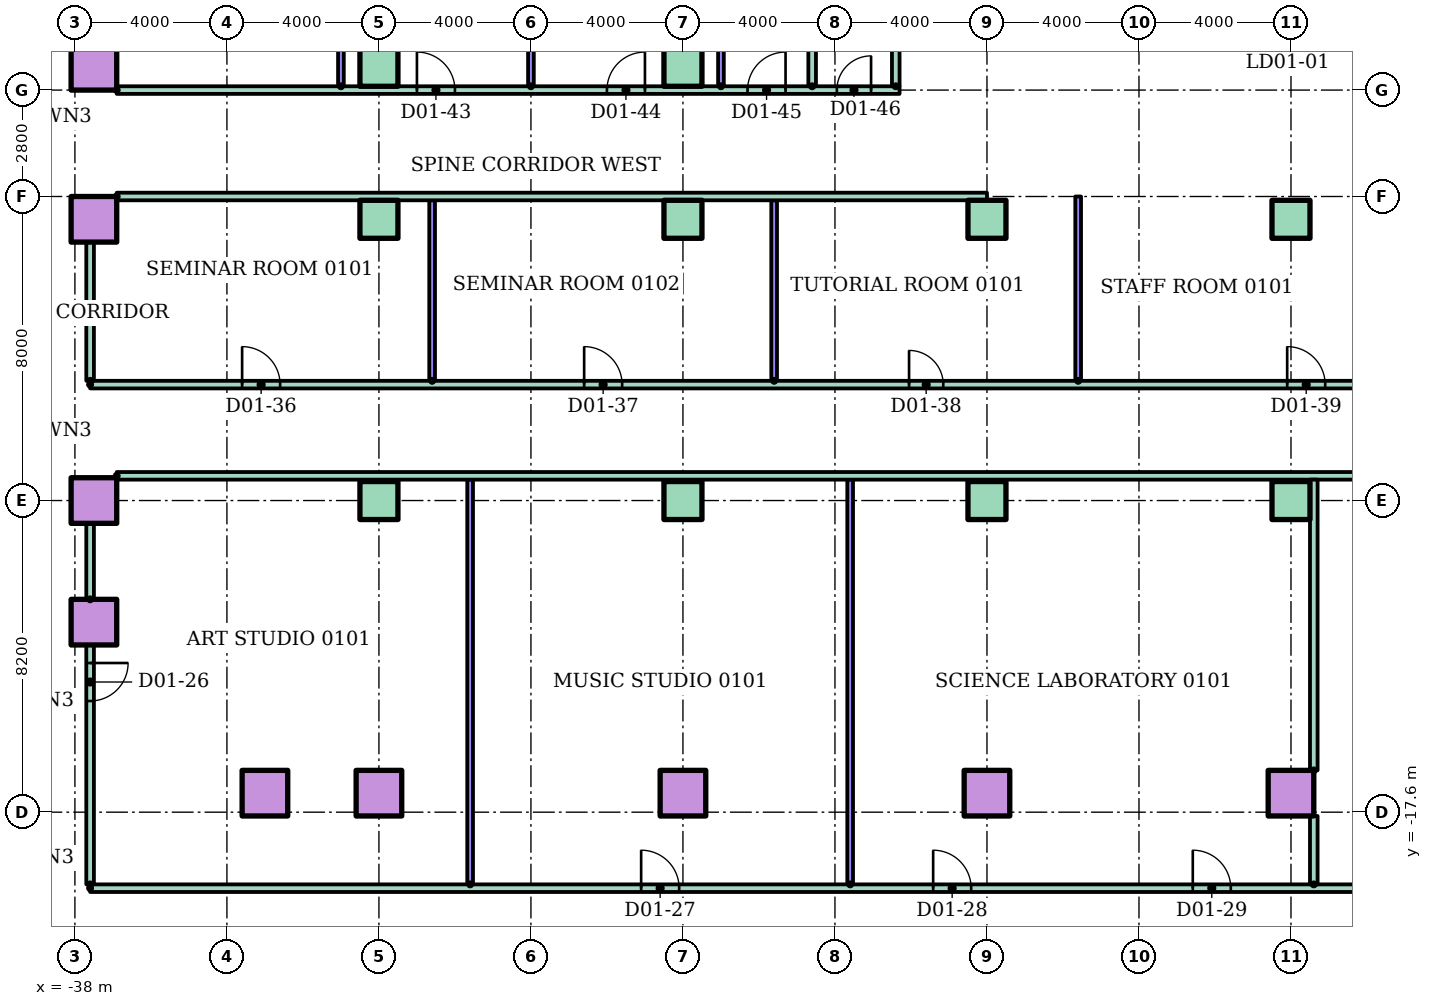
"""IFC4 building model, lengths in metres.
Left out: names, types, materials, properties, quantities, classifications, styles, units other than length and angle.
Written with IfcOpenShell. Run it as: python <this file> out.ifc"""

import sys

from ifc_helpers import new_model, si_unit, direction, frame, frame_2d, origin, origin_2d, place, context, subcontext, project, spatial, rectangle, hollow_rectangle, extrude, element, fill, save


model = new_model("IFC4")
c1 = context("Model", 3, precision=1e-05, world=origin(), true_north=direction((0.0, 1.0)))
c2 = subcontext(c1, "Body", "Model", "MODEL_VIEW")
j1 = project(units=[si_unit("LENGTHUNIT", "METRE"), si_unit("PLANEANGLEUNIT", "RADIAN")], contexts=[c1])
p1 = place(None, origin())
s1 = spatial("IfcSite", under=j1, at=p1, CompositionType="ELEMENT")
p2 = place(p1, origin())
s2 = spatial("IfcBuilding", under=s1, at=p2, CompositionType="ELEMENT")
p3 = place(p2, frame((0.0, 0.0, 6.0)))
s3 = spatial("IfcBuildingStorey", under=s2, at=p3, CompositionType="ELEMENT", Elevation=6.0)
for number, where in (
    (1, (-33.0, -17.1, 0.0)),
    (2, (-30.0, -17.1, 0.0)),
    (3, (-22.0, -17.1, 0.0)),
    (4, (-14.0, -17.1, 0.0)),
    (5, (-6.0, -17.1, 0.0)),
    (6, (-37.5, -12.6, 0.0)),
    (7, (-37.5, -9.4, 0.0)),
):
    element("IfcColumn", number, at=place(p3, frame(where)), inside=s3, PredefinedType="COLUMN", context=c2, shape_type="SweptSolid", body=[
        extrude(hollow_rectangle(XDim=1.2, YDim=1.2, WallThickness=0.06, at=origin_2d()), origin(), (0.0, 0.0, 1.0), 4.0),
    ])
for number, where in (
    (8, (-30.0, -9.4, 0.0)),
    (9, (-22.0, -9.4, 0.0)),
    (10, (-14.0, -9.4, 0.0)),
    (11, (-6.0, -9.4, 0.0)),
):
    element("IfcColumn", number, at=place(p3, frame(where)), inside=s3, PredefinedType="COLUMN", context=c2, shape_type="SweptSolid", body=[
        extrude(rectangle(XDim=1.0, YDim=1.0, at=origin_2d()), origin(), (0.0, 0.0, 1.0), 4.0),
    ])
p4 = place(p3, frame((-37.5, -2.0, 0.0)))
e12 = element("IfcColumn", 12, at=p4, inside=s3, PredefinedType="COLUMN", context=c2, shape_type="SweptSolid", body=[
    extrude(hollow_rectangle(XDim=1.2, YDim=1.2, WallThickness=0.06, at=origin_2d()), origin(), (0.0, 0.0, 1.0), 4.0),
])
for number, where in (
    (13, (-30.0, -2.0, 0.0)),
    (14, (-22.0, -2.0, 0.0)),
    (15, (-14.0, -2.0, 0.0)),
    (16, (-6.0, -2.0, 0.0)),
):
    element("IfcColumn", number, at=place(p3, frame(where)), inside=s3, PredefinedType="COLUMN", context=c2, shape_type="SweptSolid", body=[
        extrude(rectangle(XDim=1.0, YDim=1.0, at=origin_2d()), origin(), (0.0, 0.0, 1.0), 4.0),
    ])
p5 = place(p3, frame((-37.5, 2.0, 0.0)))
e17 = element("IfcColumn", 17, at=p5, inside=s3, PredefinedType="COLUMN", context=c2, shape_type="SweptSolid", body=[
    extrude(hollow_rectangle(XDim=1.2, YDim=1.2, WallThickness=0.06, at=origin_2d()), origin(), (0.0, 0.0, 1.0), 4.0),
])
for number, where in (
    (18, (-30.0, 2.0, 0.0)),
    (19, (-22.0, 2.0, 0.0)),
):
    element("IfcColumn", number, at=place(p3, frame(where)), inside=s3, PredefinedType="COLUMN", context=c2, shape_type="SweptSolid", body=[
        extrude(rectangle(XDim=1.0, YDim=1.0, at=origin_2d()), origin(), (0.0, 0.0, 1.0), 4.0),
    ])
p6 = place(p3, frame((-37.6, -19.6, 0.0)))
e20 = element("IfcWall", 20, at=p6, inside=s3, PredefinedType="PARTITIONING", context=c2, shape_type="SweptSolid", body=[
    extrude(rectangle(XDim=75.2, YDim=0.2, at=frame_2d((37.6, 0.0))), origin(), (0.0, 0.0, 1.0), 3.7),
])
p7 = place(p6, frame((14.5, 0.0, 0.0)))
e21 = element("IfcOpeningElement", 21, at=p7, cuts=e20, PredefinedType="OPENING", context=c2, shape_type="SweptSolid", body=[
    extrude(rectangle(XDim=1.0, YDim=2.1, at=frame_2d((0.5, 1.05))), frame((0.0, 0.11, 0.0), z_axis=(0.0, -1.0, 0.0), x_axis=(1.0, 0.0, 0.0)), (0.0, 0.0, 1.0), 0.22),
])
p8 = place(p6, frame((22.184, 0.0, 0.0)))
e22 = element("IfcOpeningElement", 22, at=p8, cuts=e20, PredefinedType="OPENING", context=c2, shape_type="SweptSolid", body=[
    extrude(rectangle(XDim=1.0, YDim=2.1, at=frame_2d((0.5, 1.05))), frame((0.0, 0.11, 0.0), z_axis=(0.0, -1.0, 0.0), x_axis=(1.0, 0.0, 0.0)), (0.0, 0.0, 1.0), 0.22),
])
p9 = place(p6, frame((29.016, 0.0, 0.0)))
e23 = element("IfcOpeningElement", 23, at=p9, cuts=e20, PredefinedType="OPENING", context=c2, shape_type="SweptSolid", body=[
    extrude(rectangle(XDim=1.0, YDim=2.1, at=frame_2d((0.5, 1.05))), frame((0.0, 0.11, 0.0), z_axis=(0.0, -1.0, 0.0), x_axis=(1.0, 0.0, 0.0)), (0.0, 0.0, 1.0), 0.22),
])
p10 = place(p6, frame((34.34, 0.0, 0.0)))
e24 = element("IfcOpeningElement", 24, at=p10, cuts=e20, PredefinedType="OPENING", context=c2, shape_type="SweptSolid", body=[
    extrude(rectangle(XDim=1.0, YDim=2.1, at=frame_2d((0.5, 1.05))), frame((0.0, 0.11, 0.0), z_axis=(0.0, -1.0, 0.0), x_axis=(1.0, 0.0, 0.0)), (0.0, 0.0, 1.0), 0.22),
])
p11 = place(p6, frame((41.06, 0.0, 0.0)))
e25 = element("IfcOpeningElement", 25, at=p11, cuts=e20, PredefinedType="OPENING", context=c2, shape_type="SweptSolid", body=[
    extrude(rectangle(XDim=1.0, YDim=2.1, at=frame_2d((0.5, 1.05))), frame((0.0, 0.11, 0.0), z_axis=(0.0, -1.0, 0.0), x_axis=(1.0, 0.0, 0.0)), (0.0, 0.0, 1.0), 0.22),
])
p12 = place(p6, frame((46.95, 0.0, 0.0)))
e26 = element("IfcOpeningElement", 26, at=p12, cuts=e20, PredefinedType="OPENING", context=c2, shape_type="SweptSolid", body=[
    extrude(rectangle(XDim=1.1, YDim=2.1, at=frame_2d((0.55, 1.05))), frame((0.0, 0.11, 0.0), z_axis=(0.0, -1.0, 0.0), x_axis=(1.0, 0.0, 0.0)), (0.0, 0.0, 1.0), 0.22),
])
p13 = place(p6, frame((55.35, 0.0, 0.0)))
e27 = element("IfcOpeningElement", 27, at=p13, cuts=e20, PredefinedType="OPENING", context=c2, shape_type="SweptSolid", body=[
    extrude(rectangle(XDim=1.1, YDim=2.1, at=frame_2d((0.55, 1.05))), frame((0.0, 0.11, 0.0), z_axis=(0.0, -1.0, 0.0), x_axis=(1.0, 0.0, 0.0)), (0.0, 0.0, 1.0), 0.22),
])
p14 = place(p6, frame((62.7, 0.0, 0.0)))
e28 = element("IfcOpeningElement", 28, at=p14, cuts=e20, PredefinedType="OPENING", context=c2, shape_type="SweptSolid", body=[
    extrude(rectangle(XDim=1.0, YDim=2.1, at=frame_2d((0.5, 1.05))), frame((0.0, 0.11, 0.0), z_axis=(0.0, -1.0, 0.0), x_axis=(1.0, 0.0, 0.0)), (0.0, 0.0, 1.0), 0.22),
])
p15 = place(p3, frame((-36.9, -8.75, 0.0)))
e29 = element("IfcWall", 29, at=p15, inside=s3, PredefinedType="PARTITIONING", context=c2, shape_type="SweptSolid", body=[
    extrude(rectangle(XDim=73.8, YDim=0.2, at=frame_2d((36.9, 0.0))), origin(), (0.0, 0.0, 1.0), 3.7),
])
p16 = place(p3, frame((-37.6, -6.35, 0.0)))
e30 = element("IfcWall", 30, at=p16, inside=s3, PredefinedType="PARTITIONING", context=c2, shape_type="SweptSolid", body=[
    extrude(rectangle(XDim=75.2, YDim=0.2, at=frame_2d((37.6, 0.0))), origin(), (0.0, 0.0, 1.0), 3.7),
])
p17 = place(p16, frame((4.0, 0.0, 0.0)))
e31 = element("IfcOpeningElement", 31, at=p17, cuts=e30, PredefinedType="OPENING", context=c2, shape_type="SweptSolid", body=[
    extrude(rectangle(XDim=1.0, YDim=2.1, at=frame_2d((0.5, 1.05))), frame((0.0, 0.11, 0.0), z_axis=(0.0, -1.0, 0.0), x_axis=(1.0, 0.0, 0.0)), (0.0, 0.0, 1.0), 0.22),
])
p18 = place(p16, frame((13.0, 0.0, 0.0)))
e32 = element("IfcOpeningElement", 32, at=p18, cuts=e30, PredefinedType="OPENING", context=c2, shape_type="SweptSolid", body=[
    extrude(rectangle(XDim=1.0, YDim=2.1, at=frame_2d((0.5, 1.05))), frame((0.0, 0.11, 0.0), z_axis=(0.0, -1.0, 0.0), x_axis=(1.0, 0.0, 0.0)), (0.0, 0.0, 1.0), 0.22),
])
p19 = place(p16, frame((21.55, 0.0, 0.0)))
e33 = element("IfcOpeningElement", 33, at=p19, cuts=e30, PredefinedType="OPENING", context=c2, shape_type="SweptSolid", body=[
    extrude(rectangle(XDim=0.9, YDim=2.1, at=frame_2d((0.45, 1.05))), frame((0.0, 0.11, 0.0), z_axis=(0.0, -1.0, 0.0), x_axis=(1.0, 0.0, 0.0)), (0.0, 0.0, 1.0), 0.22),
])
p20 = place(p16, frame((31.5, 0.0, 0.0)))
e34 = element("IfcOpeningElement", 34, at=p20, cuts=e30, PredefinedType="OPENING", context=c2, shape_type="SweptSolid", body=[
    extrude(rectangle(XDim=1.0, YDim=2.1, at=frame_2d((0.5, 1.05))), frame((0.0, 0.11, 0.0), z_axis=(0.0, -1.0, 0.0), x_axis=(1.0, 0.0, 0.0)), (0.0, 0.0, 1.0), 0.22),
])
p21 = place(p16, frame((43.5, 0.0, 0.0)))
e35 = element("IfcOpeningElement", 35, at=p21, cuts=e30, PredefinedType="OPENING", context=c2, shape_type="SweptSolid", body=[
    extrude(rectangle(XDim=1.0, YDim=2.1, at=frame_2d((0.5, 1.05))), frame((0.0, 0.11, 0.0), z_axis=(0.0, -1.0, 0.0), x_axis=(1.0, 0.0, 0.0)), (0.0, 0.0, 1.0), 0.22),
])
p22 = place(p16, frame((62.1, 0.0, 0.0)))
e36 = element("IfcOpeningElement", 36, at=p22, cuts=e30, PredefinedType="OPENING", context=c2, shape_type="SweptSolid", body=[
    extrude(rectangle(XDim=1.0, YDim=2.1, at=frame_2d((0.5, 1.05))), frame((0.0, 0.11, 0.0), z_axis=(0.0, -1.0, 0.0), x_axis=(1.0, 0.0, 0.0)), (0.0, 0.0, 1.0), 0.22),
])
p23 = place(p3, frame((-36.9, -1.4, 0.0)))
e37 = element("IfcWall", 37, at=p23, inside=s3, PredefinedType="PARTITIONING", context=c2, shape_type="SweptSolid", body=[
    extrude(rectangle(XDim=22.9, YDim=0.2, at=frame_2d((11.45, 0.0))), origin(), (0.0, 0.0, 1.0), 3.7),
])
p24 = place(p3, frame((-36.9, 1.4, 0.0)))
e38 = element("IfcWall", 38, at=p24, inside=s3, PredefinedType="PARTITIONING", context=c2, shape_type="SweptSolid", body=[
    extrude(rectangle(XDim=20.6, YDim=0.2, at=frame_2d((10.3, 0.0))), origin(), (0.0, 0.0, 1.0), 3.7),
])
p25 = place(p24, frame((7.9, 0.0, 0.0)))
e39 = element("IfcOpeningElement", 39, at=p25, cuts=e38, PredefinedType="OPENING", context=c2, shape_type="SweptSolid", body=[
    extrude(rectangle(XDim=1.0, YDim=2.1, at=frame_2d((0.5, 1.05))), frame((0.0, 0.11, 0.0), z_axis=(0.0, -1.0, 0.0), x_axis=(1.0, 0.0, 0.0)), (0.0, 0.0, 1.0), 0.22),
])
p26 = place(p24, frame((12.9, 0.0, 0.0)))
e40 = element("IfcOpeningElement", 40, at=p26, cuts=e38, PredefinedType="OPENING", context=c2, shape_type="SweptSolid", body=[
    extrude(rectangle(XDim=1.0, YDim=2.1, at=frame_2d((0.5, 1.05))), frame((0.0, 0.11, 0.0), z_axis=(0.0, -1.0, 0.0), x_axis=(1.0, 0.0, 0.0)), (0.0, 0.0, 1.0), 0.22),
])
p27 = place(p24, frame((16.6, 0.0, 0.0)))
e41 = element("IfcOpeningElement", 41, at=p27, cuts=e38, PredefinedType="OPENING", context=c2, shape_type="SweptSolid", body=[
    extrude(rectangle(XDim=1.0, YDim=2.1, at=frame_2d((0.5, 1.05))), frame((0.0, 0.11, 0.0), z_axis=(0.0, -1.0, 0.0), x_axis=(1.0, 0.0, 0.0)), (0.0, 0.0, 1.0), 0.22),
])
p28 = place(p24, frame((18.95, 0.0, 0.0)))
e42 = element("IfcOpeningElement", 42, at=p28, cuts=e38, PredefinedType="OPENING", context=c2, shape_type="SweptSolid", body=[
    extrude(rectangle(XDim=0.9, YDim=2.1, at=frame_2d((0.45, 1.05))), frame((0.0, 0.11, 0.0), z_axis=(0.0, -1.0, 0.0), x_axis=(1.0, 0.0, 0.0)), (0.0, 0.0, 1.0), 0.22),
])
p29 = place(p3, frame((-37.6, -19.5, 0.0), z_axis=(0.0, 0.0, 1.0), x_axis=(0.0, 1.0, 0.0)))
e43 = element("IfcWall", 43, at=p29, inside=s3, PredefinedType="PARTITIONING", context=c2, shape_type="SweptSolid", body=[
    extrude(rectangle(XDim=6.3, YDim=0.2, at=frame_2d((3.15, 0.0))), origin(), (0.0, 0.0, 1.0), 3.7),
])
p30 = place(p29, frame((4.825, 0.0, 0.0)))
e44 = element("IfcOpeningElement", 44, at=p30, cuts=e43, PredefinedType="OPENING", context=c2, shape_type="SweptSolid", body=[
    extrude(rectangle(XDim=1.0, YDim=2.1, at=frame_2d((0.5, 1.05))), frame((0.0, 0.11, 0.0), z_axis=(0.0, -1.0, 0.0), x_axis=(1.0, 0.0, 0.0)), (0.0, 0.0, 1.0), 0.22),
])
p31 = place(p3, frame((-37.6, -12.0, 0.0), z_axis=(0.0, 0.0, 1.0), x_axis=(0.0, 1.0, 0.0)))
e45 = element("IfcWall", 45, at=p31, inside=s3, PredefinedType="PARTITIONING", context=c2, shape_type="SweptSolid", body=[
    extrude(rectangle(XDim=2.0, YDim=0.2, at=frame_2d((1.0, 0.0))), origin(), (0.0, 0.0, 1.0), 3.7),
])
p32 = place(p3, frame((-37.6, -6.25, 0.0), z_axis=(0.0, 0.0, 1.0), x_axis=(0.0, 1.0, 0.0)))
e46 = element("IfcWall", 46, at=p32, inside=s3, PredefinedType="PARTITIONING", context=c2, shape_type="SweptSolid", body=[
    extrude(rectangle(XDim=3.65, YDim=0.2, at=frame_2d((1.825, 0.0))), origin(), (0.0, 0.0, 1.0), 3.7),
])
p33 = place(p3, frame((-31.0, 1.5, 0.0), z_axis=(0.0, 0.0, 1.0), x_axis=(0.0, 1.0, 0.0)))
e47 = element("IfcWall", 47, at=p33, inside=s3, PredefinedType="PARTITIONING", context=c2, shape_type="SweptSolid", body=[
    extrude(rectangle(XDim=7.0, YDim=0.15, at=frame_2d((3.5, 0.0))), origin(), (0.0, 0.0, 1.0), 3.7),
])
p34 = place(p3, frame((-28.6, -6.25, 0.0), z_axis=(0.0, 0.0, 1.0), x_axis=(0.0, 1.0, 0.0)))
e48 = element("IfcWall", 48, at=p34, inside=s3, PredefinedType="PARTITIONING", context=c2, shape_type="SweptSolid", body=[
    extrude(rectangle(XDim=4.75, YDim=0.15, at=frame_2d((2.375, 0.0))), origin(), (0.0, 0.0, 1.0), 3.7),
])
p35 = place(p3, frame((-27.6, -19.5, 0.0), z_axis=(0.0, 0.0, 1.0), x_axis=(0.0, 1.0, 0.0)))
e49 = element("IfcWall", 49, at=p35, inside=s3, PredefinedType="PARTITIONING", context=c2, shape_type="SweptSolid", body=[
    extrude(rectangle(XDim=10.65, YDim=0.15, at=frame_2d((5.325, 0.0))), origin(), (0.0, 0.0, 1.0), 3.7),
])
for number, where, z_axis, x_axis in (
    (50, (-26.0, 1.5, 0.0), (0.0, 0.0, 1.0), (0.0, 1.0, 0.0)),
    (51, (-21.0, 1.5, 0.0), (0.0, 0.0, 1.0), (0.0, 1.0, 0.0)),
):
    element("IfcWall", number, at=place(p3, frame(where, z_axis=z_axis, x_axis=x_axis)), inside=s3, PredefinedType="PARTITIONING", context=c2, shape_type="SweptSolid", body=[
        extrude(rectangle(XDim=7.0, YDim=0.15, at=frame_2d((3.5, 0.0))), origin(), (0.0, 0.0, 1.0), 3.7),
    ])
p36 = place(p3, frame((-19.6, -6.25, 0.0), z_axis=(0.0, 0.0, 1.0), x_axis=(0.0, 1.0, 0.0)))
e52 = element("IfcWall", 52, at=p36, inside=s3, PredefinedType="PARTITIONING", context=c2, shape_type="SweptSolid", body=[
    extrude(rectangle(XDim=4.75, YDim=0.15, at=frame_2d((2.375, 0.0))), origin(), (0.0, 0.0, 1.0), 3.7),
])
p37 = place(p3, frame((-18.6, 1.5, 0.0), z_axis=(0.0, 0.0, 1.0), x_axis=(0.0, 1.0, 0.0)))
e53 = element("IfcWall", 53, at=p37, inside=s3, PredefinedType="PARTITIONING", context=c2, shape_type="SweptSolid", body=[
    extrude(rectangle(XDim=7.0, YDim=0.2, at=frame_2d((3.5, 0.0))), origin(), (0.0, 0.0, 1.0), 3.7),
])
p38 = place(p3, frame((-17.6, -19.5, 0.0), z_axis=(0.0, 0.0, 1.0), x_axis=(0.0, 1.0, 0.0)))
e54 = element("IfcWall", 54, at=p38, inside=s3, PredefinedType="PARTITIONING", context=c2, shape_type="SweptSolid", body=[
    extrude(rectangle(XDim=10.65, YDim=0.15, at=frame_2d((5.325, 0.0))), origin(), (0.0, 0.0, 1.0), 3.7),
])
p39 = place(p3, frame((-16.4, 1.5, 0.0), z_axis=(0.0, 0.0, 1.0), x_axis=(0.0, 1.0, 0.0)))
e55 = element("IfcWall", 55, at=p39, inside=s3, PredefinedType="PARTITIONING", context=c2, shape_type="SweptSolid", body=[
    extrude(rectangle(XDim=7.0, YDim=0.2, at=frame_2d((3.5, 0.0))), origin(), (0.0, 0.0, 1.0), 3.7),
])
p40 = place(p3, frame((-11.6, -6.25, 0.0), z_axis=(0.0, 0.0, 1.0), x_axis=(0.0, 1.0, 0.0)))
e56 = element("IfcWall", 56, at=p40, inside=s3, PredefinedType="PARTITIONING", context=c2, shape_type="SweptSolid", body=[
    extrude(rectangle(XDim=4.85, YDim=0.15, at=frame_2d((2.425, 0.0))), origin(), (0.0, 0.0, 1.0), 3.7),
])
p41 = place(p3, frame((-5.4, -19.5, 0.0), z_axis=(0.0, 0.0, 1.0), x_axis=(0.0, 1.0, 0.0)))
e57 = element("IfcWall", 57, at=p41, inside=s3, PredefinedType="PARTITIONING", context=c2, shape_type="SweptSolid", body=[
    extrude(rectangle(XDim=1.8, YDim=0.2, at=frame_2d((0.9, 0.0))), origin(), (0.0, 0.0, 1.0), 3.7),
])
p42 = place(p3, frame((-5.4, -16.5, 0.0), z_axis=(0.0, 0.0, 1.0), x_axis=(0.0, 1.0, 0.0)))
e58 = element("IfcWall", 58, at=p42, inside=s3, PredefinedType="PARTITIONING", context=c2, shape_type="SweptSolid", body=[
    extrude(rectangle(XDim=7.65, YDim=0.2, at=frame_2d((3.825, 0.0))), origin(), (0.0, 0.0, 1.0), 3.7),
])
p43 = place(p30, frame((1.0, 0.0, 0.0), z_axis=(0.0, 0.0, 1.0), x_axis=(-1.0, 0.0, 0.0)))
e59 = element("IfcDoor", 59, at=p43, inside=s3, OperationType="SINGLE_SWING_RIGHT", PredefinedType="DOOR", context=c2, shape_type="SweptSolid", body=[
    extrude(rectangle(XDim=1.0, YDim=2.1, at=frame_2d((0.5, 1.05))), frame((0.0, 0.025, 0.0), z_axis=(0.0, -1.0, 0.0), x_axis=(1.0, 0.0, 0.0)), (0.0, 0.0, 1.0), 0.05),
])
fill(e44, e59)
p44 = place(p7, origin())
e60 = element("IfcDoor", 60, at=p44, inside=s3, OperationType="SINGLE_SWING_LEFT", PredefinedType="DOOR", context=c2, shape_type="SweptSolid", body=[
    extrude(rectangle(XDim=1.0, YDim=2.1, at=frame_2d((0.5, 1.05))), frame((0.0, 0.025, 0.0), z_axis=(0.0, -1.0, 0.0), x_axis=(1.0, 0.0, 0.0)), (0.0, 0.0, 1.0), 0.05),
])
fill(e21, e60)
p45 = place(p8, origin())
e61 = element("IfcDoor", 61, at=p45, inside=s3, OperationType="SINGLE_SWING_LEFT", PredefinedType="DOOR", context=c2, shape_type="SweptSolid", body=[
    extrude(rectangle(XDim=1.0, YDim=2.1, at=frame_2d((0.5, 1.05))), frame((0.0, 0.025, 0.0), z_axis=(0.0, -1.0, 0.0), x_axis=(1.0, 0.0, 0.0)), (0.0, 0.0, 1.0), 0.05),
])
fill(e22, e61)
p46 = place(p9, origin())
e62 = element("IfcDoor", 62, at=p46, inside=s3, OperationType="SINGLE_SWING_LEFT", PredefinedType="DOOR", context=c2, shape_type="SweptSolid", body=[
    extrude(rectangle(XDim=1.0, YDim=2.1, at=frame_2d((0.5, 1.05))), frame((0.0, 0.025, 0.0), z_axis=(0.0, -1.0, 0.0), x_axis=(1.0, 0.0, 0.0)), (0.0, 0.0, 1.0), 0.05),
])
fill(e23, e62)
p47 = place(p17, origin())
e63 = element("IfcDoor", 63, at=p47, inside=s3, OperationType="SINGLE_SWING_LEFT", PredefinedType="DOOR", context=c2, shape_type="SweptSolid", body=[
    extrude(rectangle(XDim=1.0, YDim=2.1, at=frame_2d((0.5, 1.05))), frame((0.0, 0.025, 0.0), z_axis=(0.0, -1.0, 0.0), x_axis=(1.0, 0.0, 0.0)), (0.0, 0.0, 1.0), 0.05),
])
fill(e31, e63)
p48 = place(p18, origin())
e64 = element("IfcDoor", 64, at=p48, inside=s3, OperationType="SINGLE_SWING_LEFT", PredefinedType="DOOR", context=c2, shape_type="SweptSolid", body=[
    extrude(rectangle(XDim=1.0, YDim=2.1, at=frame_2d((0.5, 1.05))), frame((0.0, 0.025, 0.0), z_axis=(0.0, -1.0, 0.0), x_axis=(1.0, 0.0, 0.0)), (0.0, 0.0, 1.0), 0.05),
])
fill(e32, e64)
p49 = place(p19, origin())
e65 = element("IfcDoor", 65, at=p49, inside=s3, OperationType="SINGLE_SWING_LEFT", PredefinedType="DOOR", context=c2, shape_type="SweptSolid", body=[
    extrude(rectangle(XDim=0.9, YDim=2.1, at=frame_2d((0.45, 1.05))), frame((0.0, 0.025, 0.0), z_axis=(0.0, -1.0, 0.0), x_axis=(1.0, 0.0, 0.0)), (0.0, 0.0, 1.0), 0.05),
])
fill(e33, e65)
p50 = place(p20, origin())
e66 = element("IfcDoor", 66, at=p50, inside=s3, OperationType="SINGLE_SWING_LEFT", PredefinedType="DOOR", context=c2, shape_type="SweptSolid", body=[
    extrude(rectangle(XDim=1.0, YDim=2.1, at=frame_2d((0.5, 1.05))), frame((0.0, 0.025, 0.0), z_axis=(0.0, -1.0, 0.0), x_axis=(1.0, 0.0, 0.0)), (0.0, 0.0, 1.0), 0.05),
])
fill(e34, e66)
p51 = place(p25, origin())
e67 = element("IfcDoor", 67, at=p51, inside=s3, OperationType="SINGLE_SWING_LEFT", PredefinedType="DOOR", context=c2, shape_type="SweptSolid", body=[
    extrude(rectangle(XDim=1.0, YDim=2.1, at=frame_2d((0.5, 1.05))), frame((0.0, 0.025, 0.0), z_axis=(0.0, -1.0, 0.0), x_axis=(1.0, 0.0, 0.0)), (0.0, 0.0, 1.0), 0.05),
])
fill(e39, e67)
p52 = place(p26, origin())
e68 = element("IfcDoor", 68, at=p52, inside=s3, OperationType="SINGLE_SWING_RIGHT", PredefinedType="DOOR", context=c2, shape_type="SweptSolid", body=[
    extrude(rectangle(XDim=1.0, YDim=2.1, at=frame_2d((0.5, 1.05))), frame((0.0, 0.025, 0.0), z_axis=(0.0, -1.0, 0.0), x_axis=(1.0, 0.0, 0.0)), (0.0, 0.0, 1.0), 0.05),
])
fill(e40, e68)
p53 = place(p27, origin())
e69 = element("IfcDoor", 69, at=p53, inside=s3, OperationType="SINGLE_SWING_RIGHT", PredefinedType="DOOR", context=c2, shape_type="SweptSolid", body=[
    extrude(rectangle(XDim=1.0, YDim=2.1, at=frame_2d((0.5, 1.05))), frame((0.0, 0.025, 0.0), z_axis=(0.0, -1.0, 0.0), x_axis=(1.0, 0.0, 0.0)), (0.0, 0.0, 1.0), 0.05),
])
fill(e41, e69)
p54 = place(p28, origin())
e70 = element("IfcDoor", 70, at=p54, inside=s3, OperationType="SINGLE_SWING_RIGHT", PredefinedType="DOOR", context=c2, shape_type="SweptSolid", body=[
    extrude(rectangle(XDim=0.9, YDim=2.1, at=frame_2d((0.45, 1.05))), frame((0.0, 0.025, 0.0), z_axis=(0.0, -1.0, 0.0), x_axis=(1.0, 0.0, 0.0)), (0.0, 0.0, 1.0), 0.05),
])
fill(e42, e70)
save(model, sys.argv[1])
